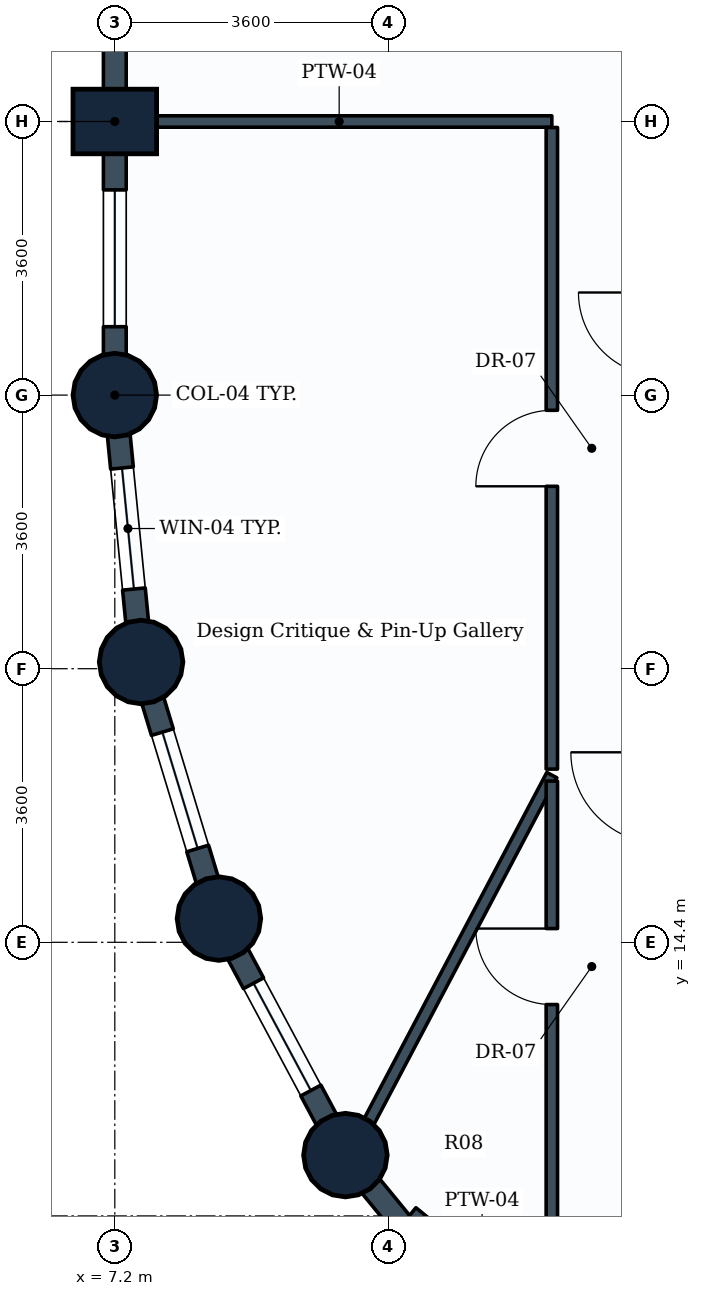
"""IFC4 building model, lengths in metres.
Left out: names, types, materials, properties, quantities, classifications, styles, units other than length and angle.
Written with IfcOpenShell. Run it as: python <this file> out.ifc"""

import sys

from ifc_helpers import new_model, si_unit, direction, frame, frame_2d, origin, origin_2d, place, context, subcontext, project, spatial, rectangle, circle, extrude, element, fill, save


model = new_model("IFC4")
c1 = context("Model", 3, precision=1e-05, world=origin(), true_north=direction((0.0, 1.0)))
c2 = subcontext(c1, "Body", "Model", "MODEL_VIEW")
j1 = project(units=[si_unit("LENGTHUNIT", "METRE"), si_unit("PLANEANGLEUNIT", "RADIAN")], contexts=[c1])
p1 = place(None, origin())
s1 = spatial("IfcSite", under=j1, at=p1, CompositionType="ELEMENT")
p2 = place(p1, origin())
s2 = spatial("IfcBuilding", under=s1, at=p2, CompositionType="ELEMENT")
p3 = place(p2, frame((0.0, 0.0, 95.7)))
s3 = spatial("IfcBuildingStorey", under=s2, at=p3, CompositionType="ELEMENT", Elevation=95.7)
p4 = place(p3, frame((7.2, 21.6, 0.0), z_axis=(0.0, 0.0, 1.0), x_axis=(1.0, 0.0, 0.0)))
e1 = element("IfcColumn", 1, at=p4, inside=s3, PredefinedType="COLUMN", context=c2, shape_type="SweptSolid", body=[
    extrude(circle(Radius=0.55, at=origin_2d()), origin(), (0.0, 0.0, 1.0), 3.9),
])
p5 = place(p3, frame((7.2, 25.2, 0.0), z_axis=(0.0, 0.0, 1.0), x_axis=(0.0, 1.0, 0.0)))
e2 = element("IfcColumn", 2, at=p5, inside=s3, PredefinedType="COLUMN", context=c2, shape_type="SweptSolid", body=[
    extrude(rectangle(XDim=0.85, YDim=1.1, at=origin_2d()), origin(), (0.0, 0.0, 1.0), 3.9),
])
for number, where, z_axis, x_axis in (
    (3, (7.546, 18.088, 0.0), (0.0, 0.0, 1.0), (1.0, 0.0, 0.0)),
    (4, (8.57, 14.712, 0.0), (0.0, 0.0, 1.0), (1.0, 0.0, 0.0)),
    (5, (10.234, 11.6, 0.0), (0.0, 0.0, 1.0), (1.0, 0.0, 0.0)),
):
    element("IfcColumn", number, at=place(p3, frame(where, z_axis=z_axis, x_axis=x_axis)), inside=s3, PredefinedType="COLUMN", context=c2, shape_type="SweptSolid", body=[
        extrude(circle(Radius=0.55, at=origin_2d()), origin(), (0.0, 0.0, 1.0), 3.9),
    ])
p6 = place(p3, frame((7.2, 25.2, 0.0), z_axis=(0.0, 0.0, 1.0), x_axis=(0.0, 1.0, 0.0)))
e6 = element("IfcWall", 6, at=p6, inside=s3, PredefinedType="STANDARD", context=c2, shape_type="SweptSolid", body=[
    extrude(rectangle(XDim=3.6, YDim=0.3, at=frame_2d((1.8, 0.0))), origin(), (0.0, 0.0, 1.0), 2.93),
])
p7 = place(p3, frame((7.2, 21.6, 0.0), z_axis=(0.0, 0.0, 1.0), x_axis=(0.0, 1.0, 0.0)))
e7 = element("IfcWall", 7, at=p7, inside=s3, PredefinedType="STANDARD", context=c2, shape_type="SweptSolid", body=[
    extrude(rectangle(XDim=3.6, YDim=0.3, at=frame_2d((1.8, 0.0))), origin(), (0.0, 0.0, 1.0), 2.93),
])
p8 = place(p7, frame((0.9, 0.0, 0.85)))
e8 = element("IfcOpeningElement", 8, at=p8, cuts=e7, PredefinedType="OPENING", context=c2, shape_type="SweptSolid", body=[
    extrude(rectangle(XDim=1.8, YDim=1.35, at=frame_2d((0.9, 0.675))), frame((0.0, 0.16, 0.0), z_axis=(0.0, -1.0, 0.0), x_axis=(1.0, 0.0, 0.0)), (0.0, 0.0, 1.0), 0.32),
])
p9 = place(p3, frame((7.546, 18.088, 0.0), z_axis=(0.0, 0.0, 1.0), x_axis=(-0.09802417461, 0.995184033831, 0.0)))
e9 = element("IfcWall", 9, at=p9, inside=s3, PredefinedType="STANDARD", context=c2, shape_type="SweptSolid", body=[
    extrude(rectangle(XDim=3.529, YDim=0.3, at=frame_2d((1.765, 0.0))), origin(), (0.0, 0.0, 1.0), 2.93),
])
p10 = place(p9, frame((0.965, 0.0, 0.85)))
e10 = element("IfcOpeningElement", 10, at=p10, cuts=e9, PredefinedType="OPENING", context=c2, shape_type="SweptSolid", body=[
    extrude(rectangle(XDim=1.6, YDim=1.35, at=frame_2d((0.8, 0.675))), frame((0.0, 0.16, 0.0), z_axis=(0.0, -1.0, 0.0), x_axis=(1.0, 0.0, 0.0)), (0.0, 0.0, 1.0), 0.32),
])
p11 = place(p3, frame((8.57, 14.712, 0.0), z_axis=(0.0, 0.0, 1.0), x_axis=(-0.290305086481, 0.956934144423, 0.0)))
e11 = element("IfcWall", 11, at=p11, inside=s3, PredefinedType="STANDARD", context=c2, shape_type="SweptSolid", body=[
    extrude(rectangle(XDim=3.528, YDim=0.3, at=frame_2d((1.764, 0.0))), origin(), (0.0, 0.0, 1.0), 2.93),
])
p12 = place(p11, frame((0.964, 0.0, 0.85)))
e12 = element("IfcOpeningElement", 12, at=p12, cuts=e11, PredefinedType="OPENING", context=c2, shape_type="SweptSolid", body=[
    extrude(rectangle(XDim=1.6, YDim=1.35, at=frame_2d((0.8, 0.675))), frame((0.0, 0.16, 0.0), z_axis=(0.0, -1.0, 0.0), x_axis=(1.0, 0.0, 0.0)), (0.0, 0.0, 1.0), 0.32),
])
p13 = place(p3, frame((10.234, 11.6, 0.0), z_axis=(0.0, 0.0, 1.0), x_axis=(-0.47151087309, 0.881860247748, 0.0)))
e13 = element("IfcWall", 13, at=p13, inside=s3, PredefinedType="STANDARD", context=c2, shape_type="SweptSolid", body=[
    extrude(rectangle(XDim=3.529, YDim=0.3, at=frame_2d((1.764, 0.0))), origin(), (0.0, 0.0, 1.0), 2.93),
])
p14 = place(p13, frame((0.964, 0.0, 0.85)))
e14 = element("IfcOpeningElement", 14, at=p14, cuts=e13, PredefinedType="OPENING", context=c2, shape_type="SweptSolid", body=[
    extrude(rectangle(XDim=1.6, YDim=1.35, at=frame_2d((0.8, 0.675))), frame((0.0, 0.16, 0.0), z_axis=(0.0, -1.0, 0.0), x_axis=(1.0, 0.0, 0.0)), (0.0, 0.0, 1.0), 0.32),
])
p15 = place(p3, frame((12.472, 8.872, 0.0), z_axis=(0.0, 0.0, 1.0), x_axis=(-0.634258295121, 0.773121216285, 0.0)))
e15 = element("IfcWall", 15, at=p15, inside=s3, PredefinedType="STANDARD", context=c2, shape_type="SweptSolid", body=[
    extrude(rectangle(XDim=3.529, YDim=0.3, at=frame_2d((1.764, 0.0))), origin(), (0.0, 0.0, 1.0), 2.93),
])
p16 = place(p3, frame((7.354, 25.2, 0.0), z_axis=(0.0, 0.0, 1.0), x_axis=(1.0, 0.0, 0.0)))
e16 = element("IfcWall", 16, at=p16, inside=s3, PredefinedType="PARTITIONING", context=c2, shape_type="SweptSolid", body=[
    extrude(rectangle(XDim=5.596, YDim=0.15, at=frame_2d((2.798, 0.0))), origin(), (0.0, 0.0, 1.0), 3.635),
])
p17 = place(p3, frame((12.95, 9.35, 0.0), z_axis=(0.0, 0.0, 1.0), x_axis=(-0.774315108081, 0.632800216022, 0.0)))
e17 = element("IfcWall", 17, at=p17, inside=s3, PredefinedType="PARTITIONING", context=c2, shape_type="SweptSolid", body=[
    extrude(rectangle(XDim=2.37, YDim=0.15, at=frame_2d((1.185, 0.0))), origin(), (0.0, 0.0, 1.0), 2.93),
])
p18 = place(p3, frame((12.95, 16.6, 0.0), z_axis=(0.0, 0.0, 1.0), x_axis=(-0.466710911312, -0.884409930554, 0.0)))
e18 = element("IfcWall", 18, at=p18, inside=s3, PredefinedType="PARTITIONING", context=c2, shape_type="SweptSolid", body=[
    extrude(rectangle(XDim=5.559, YDim=0.15, at=frame_2d((2.78, 0.0))), origin(), (0.0, 0.0, 1.0), 2.93),
])
p19 = place(p3, frame((12.95, 16.679, 0.0), z_axis=(0.0, 0.0, 1.0), x_axis=(0.0, 1.0, 0.0)))
e19 = element("IfcWall", 19, at=p19, inside=s3, PredefinedType="PARTITIONING", context=c2, shape_type="SweptSolid", body=[
    extrude(rectangle(XDim=8.442, YDim=0.15, at=frame_2d((4.221, 0.0))), origin(), (0.0, 0.0, 1.0), 3.19),
])
p20 = place(p19, frame((3.721, 0.0, 0.0)))
e20 = element("IfcOpeningElement", 20, at=p20, cuts=e19, PredefinedType="OPENING", context=c2, shape_type="SweptSolid", body=[
    extrude(rectangle(XDim=1.0, YDim=2.1, at=frame_2d((0.5, 1.05))), frame((0.0, 0.085, 0.0), z_axis=(0.0, -1.0, 0.0), x_axis=(1.0, 0.0, 0.0)), (0.0, 0.0, 1.0), 0.17),
])
p21 = place(p3, frame((12.95, 8.634, 0.0), z_axis=(0.0, 0.0, 1.0), x_axis=(0.0, 1.0, 0.0)))
e21 = element("IfcWall", 21, at=p21, inside=s3, PredefinedType="PARTITIONING", context=c2, shape_type="SweptSolid", body=[
    extrude(rectangle(XDim=7.887, YDim=0.15, at=frame_2d((3.944, 0.0))), origin(), (0.0, 0.0, 1.0), 2.93),
])
p22 = place(p21, frame((4.947, 0.0, 0.0)))
e22 = element("IfcOpeningElement", 22, at=p22, cuts=e21, PredefinedType="OPENING", context=c2, shape_type="SweptSolid", body=[
    extrude(rectangle(XDim=1.0, YDim=2.1, at=frame_2d((0.5, 1.05))), frame((0.0, 0.085, 0.0), z_axis=(0.0, -1.0, 0.0), x_axis=(1.0, 0.0, 0.0)), (0.0, 0.0, 1.0), 0.17),
])
p23 = place(p8, origin())
e23 = element("IfcWindow", 23, at=p23, inside=s3, PartitioningType="SINGLE_PANEL", PredefinedType="WINDOW", context=c2, shape_type="SweptSolid", body=[
    extrude(rectangle(XDim=1.8, YDim=1.35, at=frame_2d((0.9, 0.675))), frame((0.0, 0.03, 0.0), z_axis=(0.0, -1.0, 0.0), x_axis=(1.0, 0.0, 0.0)), (0.0, 0.0, 1.0), 0.06),
])
fill(e8, e23)
p24 = place(p10, origin())
e24 = element("IfcWindow", 24, at=p24, inside=s3, PartitioningType="SINGLE_PANEL", PredefinedType="WINDOW", context=c2, shape_type="SweptSolid", body=[
    extrude(rectangle(XDim=1.6, YDim=1.35, at=frame_2d((0.8, 0.675))), frame((0.0, 0.03, 0.0), z_axis=(0.0, -1.0, 0.0), x_axis=(1.0, 0.0, 0.0)), (0.0, 0.0, 1.0), 0.06),
])
fill(e10, e24)
p25 = place(p12, origin())
e25 = element("IfcWindow", 25, at=p25, inside=s3, PartitioningType="SINGLE_PANEL", PredefinedType="WINDOW", context=c2, shape_type="SweptSolid", body=[
    extrude(rectangle(XDim=1.6, YDim=1.35, at=frame_2d((0.8, 0.675))), frame((0.0, 0.03, 0.0), z_axis=(0.0, -1.0, 0.0), x_axis=(1.0, 0.0, 0.0)), (0.0, 0.0, 1.0), 0.06),
])
fill(e12, e25)
p26 = place(p14, origin())
e26 = element("IfcWindow", 26, at=p26, inside=s3, PartitioningType="SINGLE_PANEL", PredefinedType="WINDOW", context=c2, shape_type="SweptSolid", body=[
    extrude(rectangle(XDim=1.6, YDim=1.35, at=frame_2d((0.8, 0.675))), frame((0.0, 0.03, 0.0), z_axis=(0.0, -1.0, 0.0), x_axis=(1.0, 0.0, 0.0)), (0.0, 0.0, 1.0), 0.06),
])
fill(e14, e26)
p27 = place(p20, origin())
e27 = element("IfcDoor", 27, at=p27, inside=s3, OperationType="SINGLE_SWING_LEFT", PredefinedType="DOOR", context=c2, shape_type="SweptSolid", body=[
    extrude(rectangle(XDim=1.0, YDim=2.1, at=frame_2d((0.5, 1.05))), frame((0.0, 0.025, 0.0), z_axis=(0.0, -1.0, 0.0), x_axis=(1.0, 0.0, 0.0)), (0.0, 0.0, 1.0), 0.05),
])
fill(e20, e27)
p28 = place(p22, origin())
e28 = element("IfcDoor", 28, at=p28, inside=s3, OperationType="SINGLE_SWING_RIGHT", PredefinedType="DOOR", context=c2, shape_type="SweptSolid", body=[
    extrude(rectangle(XDim=1.0, YDim=2.1, at=frame_2d((0.5, 1.05))), frame((0.0, 0.025, 0.0), z_axis=(0.0, -1.0, 0.0), x_axis=(1.0, 0.0, 0.0)), (0.0, 0.0, 1.0), 0.05),
])
fill(e22, e28)
save(model, sys.argv[1])
